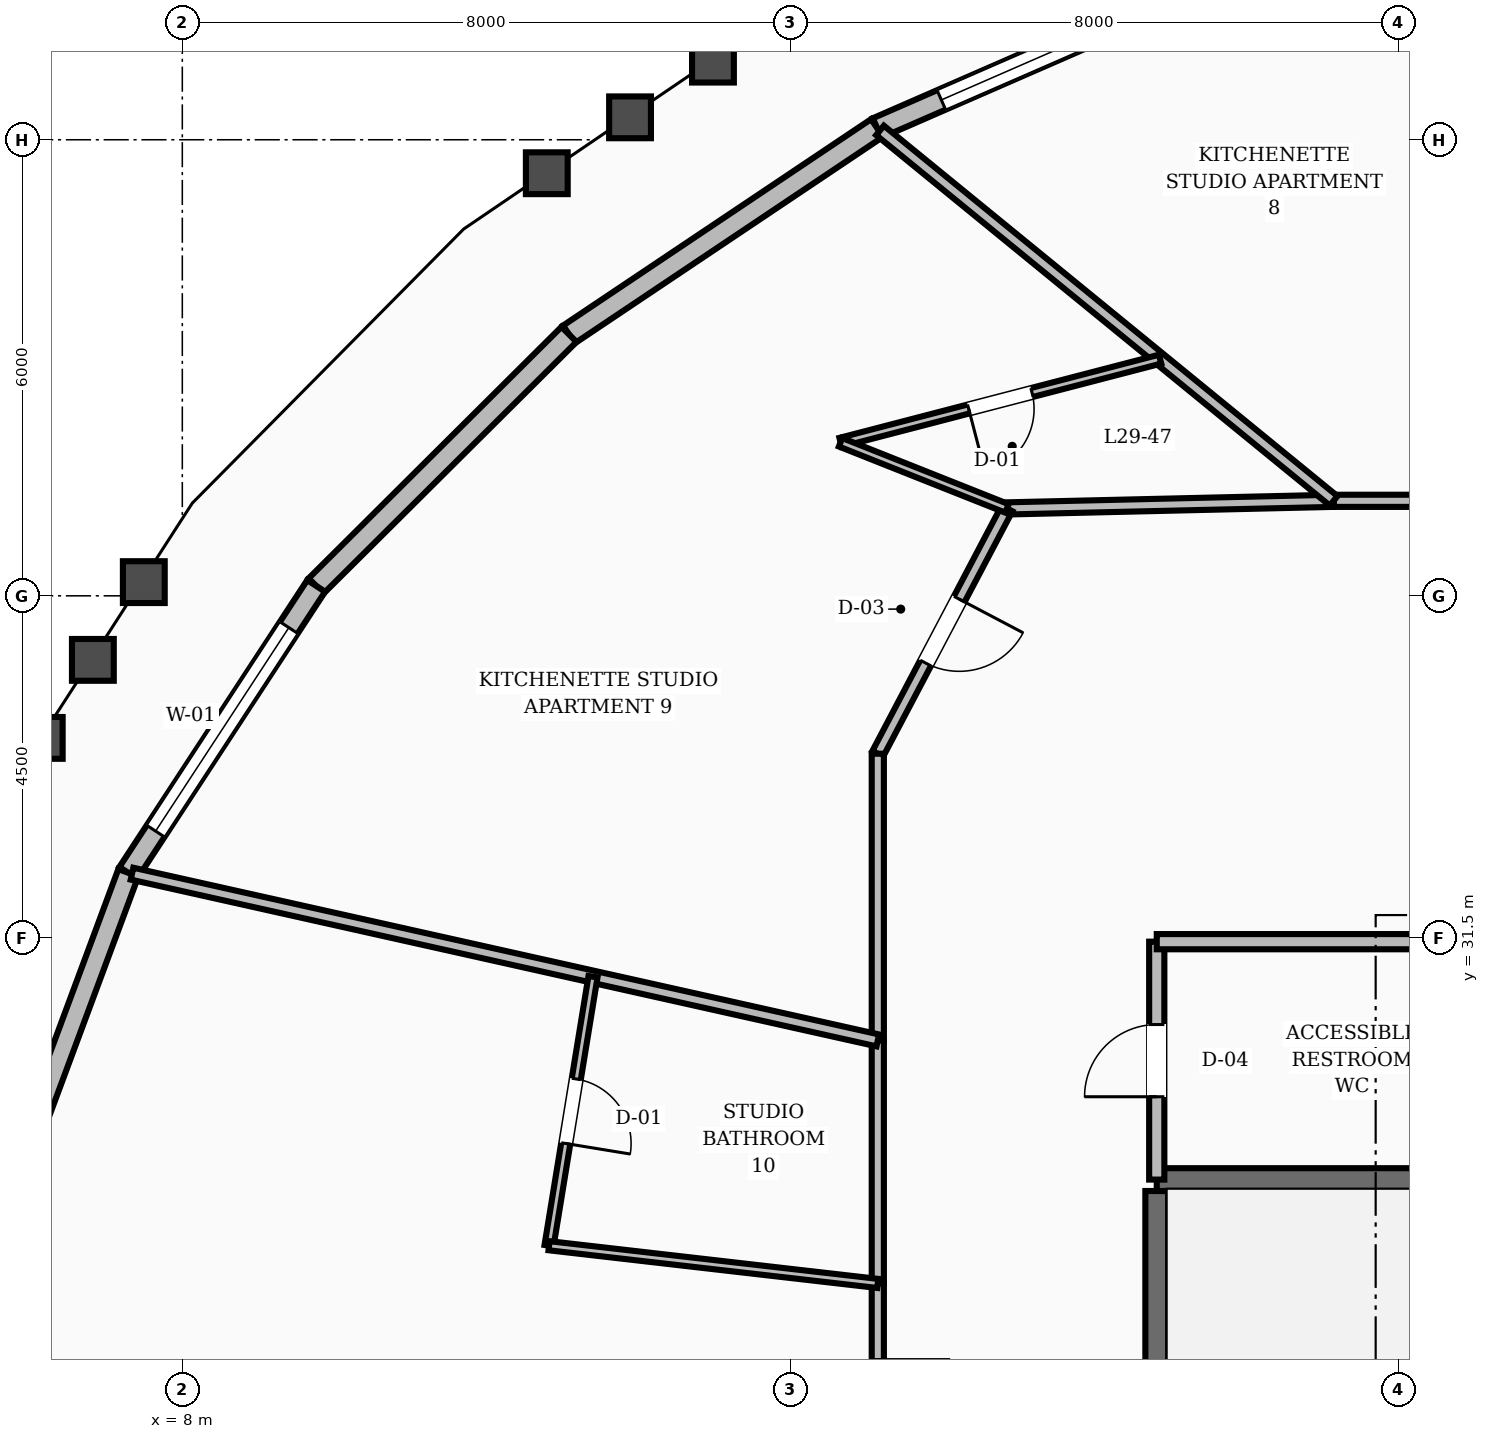
"""IFC4 building model, lengths in metres.
Left out: names, types, materials, properties, quantities, classifications, styles, units other than length and angle.
Written with IfcOpenShell. Run it as: python <this file> out.ifc"""

import sys

from ifc_helpers import new_model, si_unit, direction, frame, frame_2d, origin, place, context, subcontext, project, spatial, rectangle, extrude, element, fill, save


model = new_model("IFC4")
c1 = context("Model", 3, precision=1e-05, world=origin(), true_north=direction((0.0, 1.0)))
c2 = subcontext(c1, "Body", "Model", "MODEL_VIEW")
j1 = project(units=[si_unit("LENGTHUNIT", "METRE"), si_unit("PLANEANGLEUNIT", "RADIAN")], contexts=[c1])
p1 = place(None, origin())
s1 = spatial("IfcSite", under=j1, at=p1, CompositionType="ELEMENT")
p2 = place(p1, origin())
s2 = spatial("IfcBuilding", under=s1, at=p2, CompositionType="ELEMENT")
p3 = place(p2, frame((0.0, 0.0, 117.2)))
s3 = spatial("IfcBuildingStorey", under=s2, at=p3, CompositionType="ELEMENT", Elevation=117.2)
p4 = place(p3, frame((20.82, 19.43, 0.0), z_axis=(0.0, 0.0, 1.0), x_axis=(0.0, 1.0, 0.0)))
e1 = element("IfcWall", 1, at=p4, inside=s3, PredefinedType="SHEAR", context=c2, shape_type="SweptSolid", body=[
    extrude(rectangle(XDim=8.74, YDim=0.3, at=frame_2d((4.37, 0.0))), origin(), (0.0, 0.0, 1.0), 3.6),
])
p5 = place(p3, frame((20.82, 28.32, 0.0), z_axis=(0.0, 0.0, 1.0), x_axis=(1.0, 0.0, 0.0)))
e2 = element("IfcWall", 2, at=p5, inside=s3, PredefinedType="SHEAR", context=c2, shape_type="SweptSolid", body=[
    extrude(rectangle(XDim=3.6, YDim=0.3, at=frame_2d((1.8, 0.0))), origin(), (0.0, 0.0, 1.0), 3.6),
])
p6 = place(p3, frame((21.765, 44.173, 0.0), z_axis=(0.0, 0.0, 1.0), x_axis=(-0.916542280899, -0.39993780432, 0.0)))
e3 = element("IfcWall", 3, at=p6, inside=s3, PredefinedType="STANDARD", context=c2, shape_type="SweptSolid", body=[
    extrude(rectangle(XDim=5.045, YDim=0.28, at=frame_2d((2.523, 0.0))), origin(), (0.0, 0.0, 1.0), 2.82),
])
p7 = place(p6, frame((0.923, 0.0, 0.8)))
e4 = element("IfcOpeningElement", 4, at=p7, cuts=e3, PredefinedType="OPENING", context=c2, shape_type="SweptSolid", body=[
    extrude(rectangle(XDim=3.2, YDim=1.65, at=frame_2d((1.6, 0.825))), frame((0.0, 0.15, 0.0), z_axis=(0.0, -1.0, 0.0), x_axis=(1.0, 0.0, 0.0)), (0.0, 0.0, 1.0), 0.3),
])
p8 = place(p3, frame((17.14, 42.155, 0.0), z_axis=(0.0, 0.0, 1.0), x_axis=(-0.830785482437, -0.556592743549, 0.0)))
e5 = element("IfcWall", 5, at=p8, inside=s3, PredefinedType="STANDARD", context=c2, shape_type="SweptSolid", body=[
    extrude(rectangle(XDim=4.878, YDim=0.28, at=frame_2d((2.439, 0.0))), origin(), (0.0, 0.0, 1.0), 2.82),
])
p9 = place(p3, frame((13.087, 39.439, 0.0), z_axis=(0.0, 0.0, 1.0), x_axis=(-0.708977561681, -0.705231038052, 0.0)))
e6 = element("IfcWall", 6, at=p9, inside=s3, PredefinedType="STANDARD", context=c2, shape_type="SweptSolid", body=[
    extrude(rectangle(XDim=4.692, YDim=0.28, at=frame_2d((2.346, 0.0))), origin(), (0.0, 0.0, 1.0), 2.82),
])
p10 = place(p3, frame((9.761, 36.131, 0.0), z_axis=(0.0, 0.0, 1.0), x_axis=(-0.547750773174, -0.836641554363, 0.0)))
e7 = element("IfcWall", 7, at=p10, inside=s3, PredefinedType="STANDARD", context=c2, shape_type="SweptSolid", body=[
    extrude(rectangle(XDim=4.512, YDim=0.28, at=frame_2d((2.256, 0.0))), origin(), (0.0, 0.0, 1.0), 2.82),
])
p11 = place(p10, frame((0.656, 0.0, 0.8)))
e8 = element("IfcOpeningElement", 8, at=p11, cuts=e7, PredefinedType="OPENING", context=c2, shape_type="SweptSolid", body=[
    extrude(rectangle(XDim=3.2, YDim=1.65, at=frame_2d((1.6, 0.825))), frame((0.0, 0.15, 0.0), z_axis=(0.0, -1.0, 0.0), x_axis=(1.0, 0.0, 0.0)), (0.0, 0.0, 1.0), 0.3),
])
p12 = place(p3, frame((7.29, 32.356, 0.0), z_axis=(0.0, 0.0, 1.0), x_axis=(-0.34836047158, -0.937360646625, 0.0)))
e9 = element("IfcWall", 9, at=p12, inside=s3, PredefinedType="STANDARD", context=c2, shape_type="SweptSolid", body=[
    extrude(rectangle(XDim=4.37, YDim=0.28, at=frame_2d((2.185, 0.0))), origin(), (0.0, 0.0, 1.0), 2.82),
])
p13 = place(p3, frame((20.82, 28.32, 0.0), z_axis=(0.0, 0.0, 1.0), x_axis=(0.0, 1.0, 0.0)))
e10 = element("IfcWall", 10, at=p13, inside=s3, PredefinedType="SOLIDWALL", context=c2, shape_type="SweptSolid", body=[
    extrude(rectangle(XDim=3.13, YDim=0.2, at=frame_2d((1.565, 0.0))), origin(), (0.0, 0.0, 1.0), 2.8),
])
p14 = place(p13, frame((1.09, 0.0, 0.0)))
e11 = element("IfcOpeningElement", 11, at=p14, cuts=e10, PredefinedType="OPENING", context=c2, shape_type="SweptSolid", body=[
    extrude(rectangle(XDim=0.95, YDim=2.1, at=frame_2d((0.475, 1.05))), frame((0.0, 0.11, 0.0), z_axis=(0.0, -1.0, 0.0), x_axis=(1.0, 0.0, 0.0)), (0.0, 0.0, 1.0), 0.22),
])
p15 = place(p3, frame((20.82, 31.45, 0.0), z_axis=(0.0, 0.0, 1.0), x_axis=(1.0, 0.0, 0.0)))
e12 = element("IfcWall", 12, at=p15, inside=s3, PredefinedType="SOLIDWALL", context=c2, shape_type="SweptSolid", body=[
    extrude(rectangle(XDim=3.98, YDim=0.2, at=frame_2d((1.99, 0.0))), origin(), (0.0, 0.0, 1.0), 2.8),
])
p16 = place(p3, frame((26.512, 37.25, 0.0), z_axis=(0.0, 0.0, 1.0), x_axis=(-1.0, 0.0, 0.0)))
e13 = element("IfcWall", 13, at=p16, inside=s3, PredefinedType="SOLIDWALL", context=c2, shape_type="SweptSolid", body=[
    extrude(rectangle(XDim=3.365, YDim=0.16, at=frame_2d((1.683, 0.0))), origin(), (0.0, 0.0, 1.0), 2.8),
])
p17 = place(p16, frame((1.208, 0.0, 0.0)))
e14 = element("IfcOpeningElement", 14, at=p17, cuts=e13, PredefinedType="OPENING", context=c2, shape_type="SweptSolid", body=[
    extrude(rectangle(XDim=0.95, YDim=2.1, at=frame_2d((0.475, 1.05))), frame((0.0, 0.09, 0.0), z_axis=(0.0, -1.0, 0.0), x_axis=(1.0, 0.0, 0.0)), (0.0, 0.0, 1.0), 0.18),
])
p18 = place(p3, frame((23.146, 37.25, 0.0), z_axis=(0.0, 0.0, 1.0), x_axis=(-0.999728709658, -0.023291781507, 0.0)))
e15 = element("IfcWall", 15, at=p18, inside=s3, PredefinedType="SOLIDWALL", context=c2, shape_type="SweptSolid", body=[
    extrude(rectangle(XDim=4.298, YDim=0.16, at=frame_2d((2.149, 0.0))), origin(), (0.0, 0.0, 1.0), 2.8),
])
p19 = place(p3, frame((18.85, 37.15, 0.0), z_axis=(0.0, 0.0, 1.0), x_axis=(-0.466093963429, -0.884735224378, 0.0)))
e16 = element("IfcWall", 16, at=p19, inside=s3, PredefinedType="SOLIDWALL", context=c2, shape_type="SweptSolid", body=[
    extrude(rectangle(XDim=3.648, YDim=0.16, at=frame_2d((1.824, 0.0))), origin(), (0.0, 0.0, 1.0), 2.8),
])
p20 = place(p19, frame((1.349, 0.0, 0.0)))
e17 = element("IfcOpeningElement", 17, at=p20, cuts=e16, PredefinedType="OPENING", context=c2, shape_type="SweptSolid", body=[
    extrude(rectangle(XDim=0.95, YDim=2.1, at=frame_2d((0.475, 1.05))), frame((0.0, 0.09, 0.0), z_axis=(0.0, -1.0, 0.0), x_axis=(1.0, 0.0, 0.0)), (0.0, 0.0, 1.0), 0.18),
])
p21 = place(p3, frame((17.15, 33.923, 0.0), z_axis=(0.0, 0.0, 1.0), x_axis=(0.0, -1.0, 0.0)))
e18 = element("IfcWall", 18, at=p21, inside=s3, PredefinedType="SOLIDWALL", context=c2, shape_type="SweptSolid", body=[
    extrude(rectangle(XDim=3.771, YDim=0.16, at=frame_2d((1.886, 0.0))), origin(), (0.0, 0.0, 1.0), 2.8),
])
p22 = place(p3, frame((17.15, 30.151, 0.0), z_axis=(0.0, 0.0, 1.0), x_axis=(0.0, -1.0, 0.0)))
e19 = element("IfcWall", 19, at=p22, inside=s3, PredefinedType="SOLIDWALL", context=c2, shape_type="SweptSolid", body=[
    extrude(rectangle(XDim=3.197, YDim=0.16, at=frame_2d((1.599, 0.0))), origin(), (0.0, 0.0, 1.0), 2.8),
])
p23 = place(p3, frame((17.15, 26.954, 0.0), z_axis=(0.0, 0.0, 1.0), x_axis=(0.0, -1.0, 0.0)))
e20 = element("IfcWall", 20, at=p23, inside=s3, PredefinedType="SOLIDWALL", context=c2, shape_type="SweptSolid", body=[
    extrude(rectangle(XDim=2.954, YDim=0.16, at=frame_2d((1.477, 0.0))), origin(), (0.0, 0.0, 1.0), 2.8),
])
p24 = place(p23, frame((1.002, 0.0, 0.0)))
e21 = element("IfcOpeningElement", 21, at=p24, cuts=e20, PredefinedType="OPENING", context=c2, shape_type="SweptSolid", body=[
    extrude(rectangle(XDim=0.95, YDim=2.1, at=frame_2d((0.475, 1.05))), frame((0.0, 0.09, 0.0), z_axis=(0.0, -1.0, 0.0), x_axis=(1.0, 0.0, 0.0)), (0.0, 0.0, 1.0), 0.18),
])
p25 = place(p3, frame((23.146, 37.25, 0.0), z_axis=(0.0, 0.0, 1.0), x_axis=(-0.774531610093, 0.632535204528, 0.0)))
e22 = element("IfcWall", 22, at=p25, inside=s3, PredefinedType="SOLIDWALL", context=c2, shape_type="SweptSolid", body=[
    extrude(rectangle(XDim=7.704, YDim=0.16, at=frame_2d((3.852, 0.0))), origin(), (0.0, 0.0, 1.0), 2.8),
])
p26 = place(p3, frame((20.864, 39.114, 0.0), z_axis=(0.0, 0.0, 1.0), x_axis=(-0.967784171798, -0.251781247947, 0.0)))
e23 = element("IfcWall", 23, at=p26, inside=s3, PredefinedType="PARTITIONING", context=c2, shape_type="SweptSolid", body=[
    extrude(rectangle(XDim=4.344, YDim=0.12, at=frame_2d((2.172, 0.0))), origin(), (0.0, 0.0, 1.0), 2.8),
])
p27 = place(p26, frame((1.742, 0.0, 0.0)))
e24 = element("IfcOpeningElement", 24, at=p27, cuts=e23, PredefinedType="OPENING", context=c2, shape_type="SweptSolid", body=[
    extrude(rectangle(XDim=0.86, YDim=2.1, at=frame_2d((0.43, 1.05))), frame((0.0, 0.07, 0.0), z_axis=(0.0, -1.0, 0.0), x_axis=(1.0, 0.0, 0.0)), (0.0, 0.0, 1.0), 0.14),
])
p28 = place(p3, frame((18.85, 37.15, 0.0), z_axis=(0.0, 0.0, 1.0), x_axis=(-0.929331632403, 0.369246146921, 0.0)))
e25 = element("IfcWall", 25, at=p28, inside=s3, PredefinedType="PARTITIONING", context=c2, shape_type="SweptSolid", body=[
    extrude(rectangle(XDim=2.356, YDim=0.12, at=frame_2d((1.178, 0.0))), origin(), (0.0, 0.0, 1.0), 2.8),
])
p29 = place(p3, frame((17.15, 30.151, 0.0), z_axis=(0.0, 0.0, 1.0), x_axis=(-0.975906846943, 0.218187593804, 0.0)))
e26 = element("IfcWall", 26, at=p29, inside=s3, PredefinedType="SOLIDWALL", context=c2, shape_type="SweptSolid", body=[
    extrude(rectangle(XDim=10.054, YDim=0.16, at=frame_2d((5.027, 0.0))), origin(), (0.0, 0.0, 1.0), 2.8),
])
p30 = place(p3, frame((13.403, 30.989, 0.0), z_axis=(0.0, 0.0, 1.0), x_axis=(-0.161295662085, -0.98690612998, 0.0)))
e27 = element("IfcWall", 27, at=p30, inside=s3, PredefinedType="PARTITIONING", context=c2, shape_type="SweptSolid", body=[
    extrude(rectangle(XDim=3.586, YDim=0.12, at=frame_2d((1.793, 0.0))), origin(), (0.0, 0.0, 1.0), 2.8),
])
p31 = place(p30, frame((1.363, 0.0, 0.0)))
e28 = element("IfcOpeningElement", 28, at=p31, cuts=e27, PredefinedType="OPENING", context=c2, shape_type="SweptSolid", body=[
    extrude(rectangle(XDim=0.86, YDim=2.1, at=frame_2d((0.43, 1.05))), frame((0.0, 0.07, 0.0), z_axis=(0.0, -1.0, 0.0), x_axis=(1.0, 0.0, 0.0)), (0.0, 0.0, 1.0), 0.14),
])
p32 = place(p3, frame((17.15, 26.954, 0.0), z_axis=(0.0, 0.0, 1.0), x_axis=(-0.993486317504, 0.11395146744, 0.0)))
e29 = element("IfcWall", 29, at=p32, inside=s3, PredefinedType="PARTITIONING", context=c2, shape_type="SweptSolid", body=[
    extrude(rectangle(XDim=4.354, YDim=0.12, at=frame_2d((2.177, 0.0))), origin(), (0.0, 0.0, 1.0), 2.8),
])
p33 = place(p7, origin())
e30 = element("IfcWindow", 30, at=p33, inside=s3, PartitioningType="SINGLE_PANEL", PredefinedType="WINDOW", context=c2, shape_type="SweptSolid", body=[
    extrude(rectangle(XDim=3.2, YDim=1.65, at=frame_2d((1.6, 0.825))), frame((0.0, 0.03, 0.0), z_axis=(0.0, -1.0, 0.0), x_axis=(1.0, 0.0, 0.0)), (0.0, 0.0, 1.0), 0.06),
])
fill(e4, e30)
p34 = place(p11, origin())
e31 = element("IfcWindow", 31, at=p34, inside=s3, PartitioningType="SINGLE_PANEL", PredefinedType="WINDOW", context=c2, shape_type="SweptSolid", body=[
    extrude(rectangle(XDim=3.2, YDim=1.65, at=frame_2d((1.6, 0.825))), frame((0.0, 0.03, 0.0), z_axis=(0.0, -1.0, 0.0), x_axis=(1.0, 0.0, 0.0)), (0.0, 0.0, 1.0), 0.06),
])
fill(e8, e31)
p35 = place(p14, origin())
e32 = element("IfcDoor", 32, at=p35, inside=s3, OperationType="SINGLE_SWING_LEFT", PredefinedType="DOOR", context=c2, shape_type="SweptSolid", body=[
    extrude(rectangle(XDim=0.95, YDim=2.1, at=frame_2d((0.475, 1.05))), frame((0.0, 0.025, 0.0), z_axis=(0.0, -1.0, 0.0), x_axis=(1.0, 0.0, 0.0)), (0.0, 0.0, 1.0), 0.05),
])
fill(e11, e32)
p36 = place(p27, origin())
e33 = element("IfcDoor", 33, at=p36, inside=s3, OperationType="SINGLE_SWING_RIGHT", PredefinedType="DOOR", context=c2, shape_type="SweptSolid", body=[
    extrude(rectangle(XDim=0.86, YDim=2.1, at=frame_2d((0.43, 1.05))), frame((0.0, 0.025, 0.0), z_axis=(0.0, -1.0, 0.0), x_axis=(1.0, 0.0, 0.0)), (0.0, 0.0, 1.0), 0.05),
])
fill(e24, e33)
p37 = place(p20, origin())
e34 = element("IfcDoor", 34, at=p37, inside=s3, OperationType="SINGLE_SWING_LEFT", PredefinedType="DOOR", context=c2, shape_type="SweptSolid", body=[
    extrude(rectangle(XDim=0.95, YDim=2.1, at=frame_2d((0.475, 1.05))), frame((0.0, 0.025, 0.0), z_axis=(0.0, -1.0, 0.0), x_axis=(1.0, 0.0, 0.0)), (0.0, 0.0, 1.0), 0.05),
])
fill(e17, e34)
p38 = place(p31, origin())
e35 = element("IfcDoor", 35, at=p38, inside=s3, OperationType="SINGLE_SWING_RIGHT", PredefinedType="DOOR", context=c2, shape_type="SweptSolid", body=[
    extrude(rectangle(XDim=0.86, YDim=2.1, at=frame_2d((0.43, 1.05))), frame((0.0, 0.025, 0.0), z_axis=(0.0, -1.0, 0.0), x_axis=(1.0, 0.0, 0.0)), (0.0, 0.0, 1.0), 0.05),
])
fill(e28, e35)
save(model, sys.argv[1])
